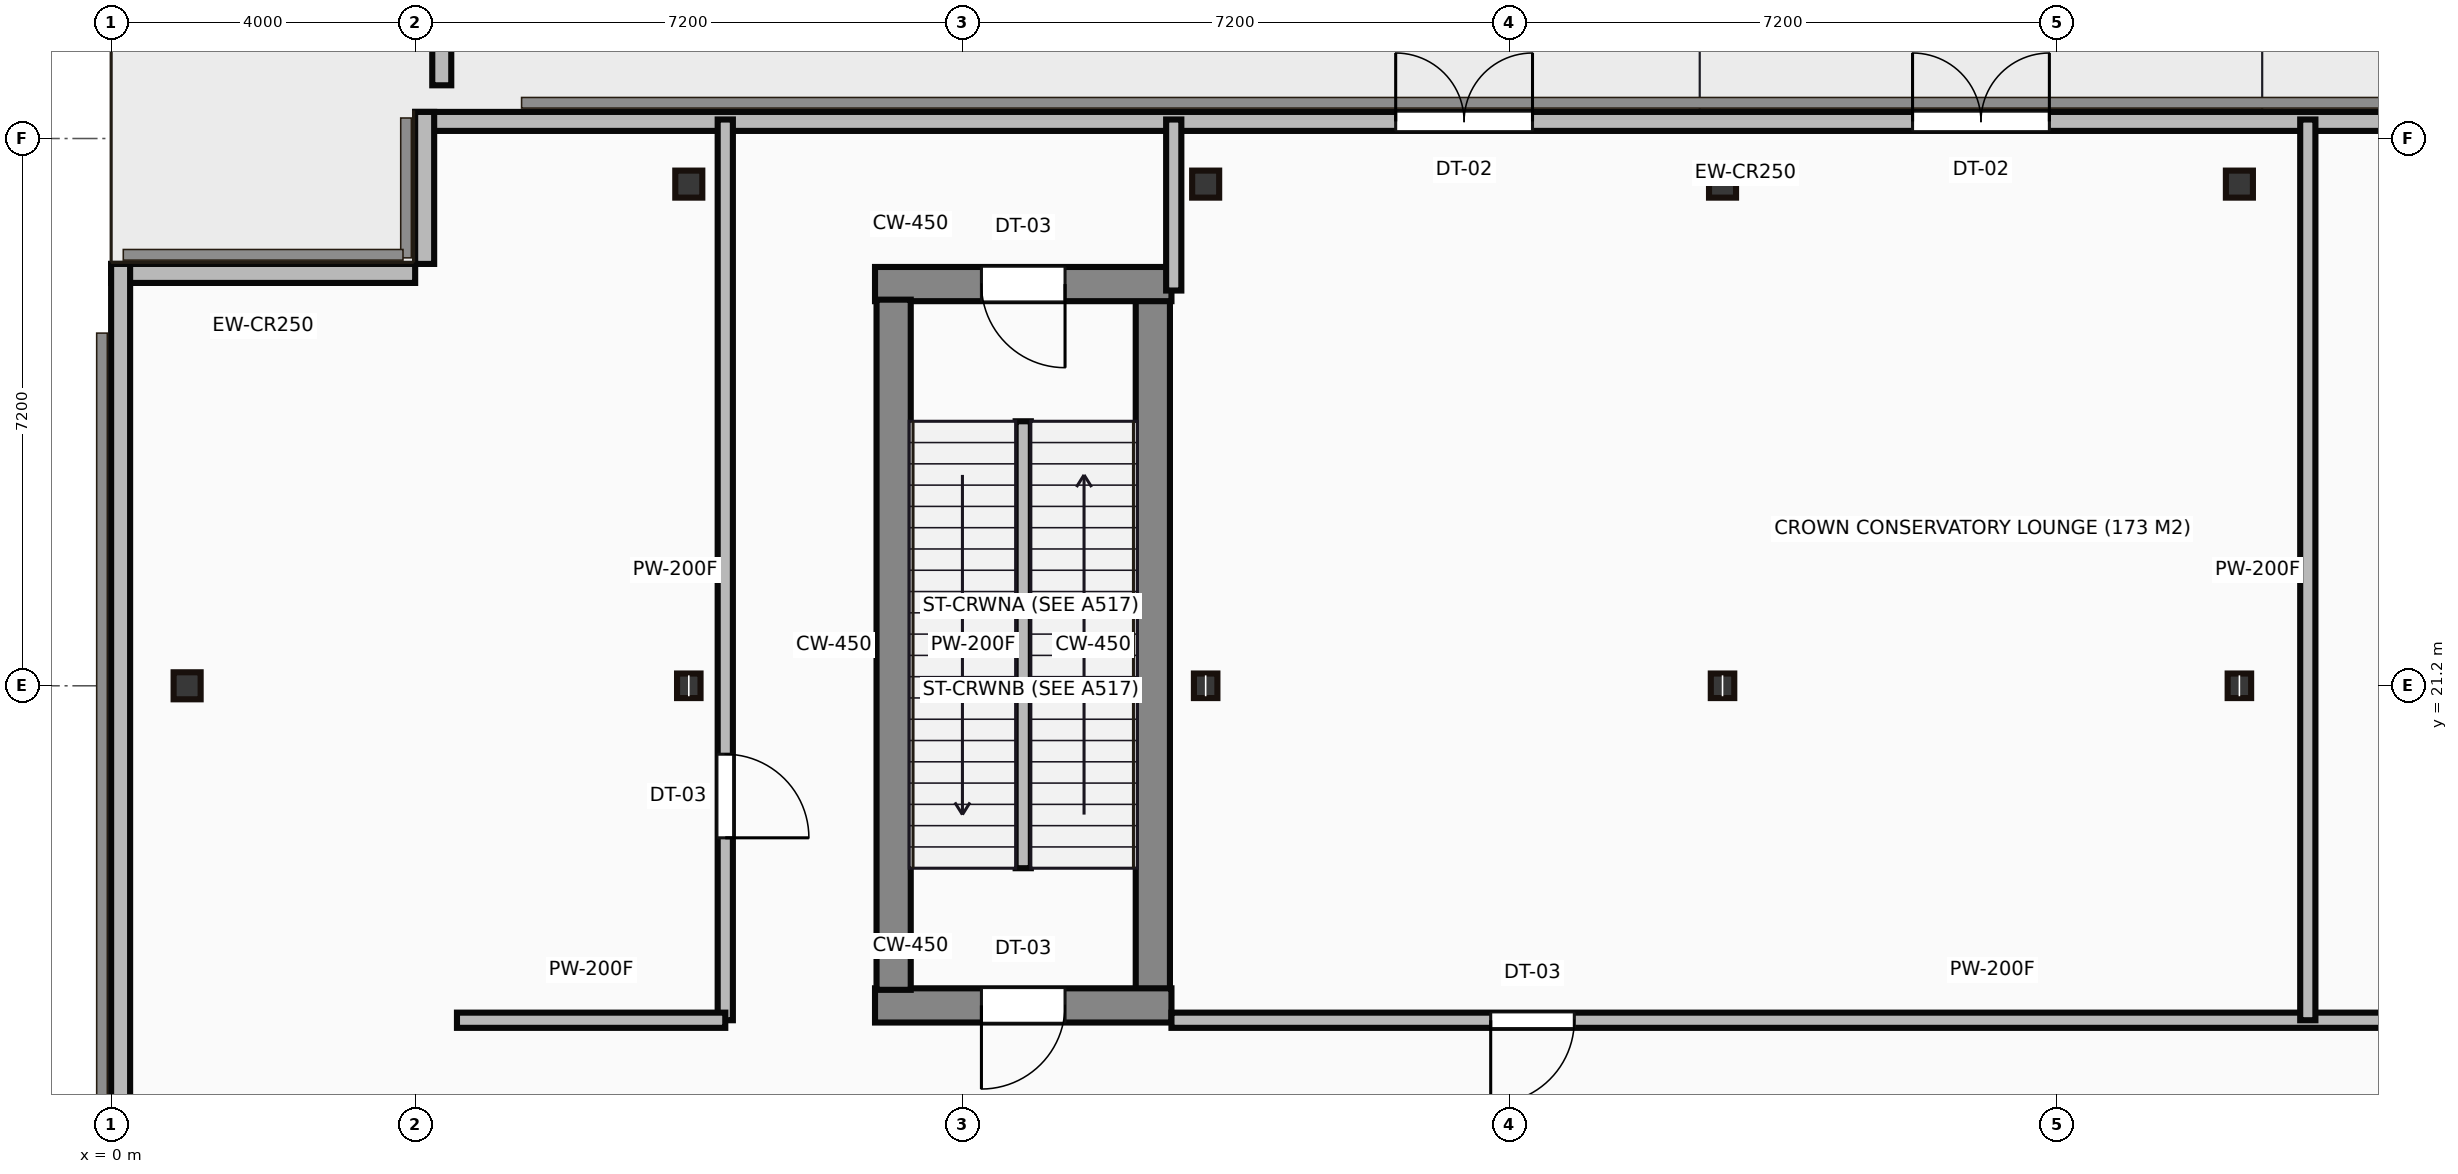
"""IFC4 building model, lengths in metres.
Left out: names, types, materials, properties, quantities, classifications, styles, units other than length and angle.
Written with IfcOpenShell. Run it as: python <this file> out.ifc"""

import sys

from ifc_helpers import new_model, si_unit, direction, frame, frame_2d, origin, origin_2d, place, context, subcontext, project, spatial, rectangle, hollow_rectangle, i_section, extrude, source, transform, mapped, element, fill, save


model = new_model("IFC4")
c1 = context("Model", 3, precision=1e-05, world=origin(), true_north=direction((0.0, 1.0)))
c2 = subcontext(c1, "Body", "Model", "MODEL_VIEW")
j1 = project(units=[si_unit("LENGTHUNIT", "METRE"), si_unit("PLANEANGLEUNIT", "RADIAN")], contexts=[c1])
p1 = place(None, origin())
s1 = spatial("IfcSite", under=j1, at=p1, CompositionType="ELEMENT")
p2 = place(p1, origin())
s2 = spatial("IfcBuilding", under=s1, at=p2, CompositionType="ELEMENT")
p3 = place(p2, frame((0.0, 0.0, 292.25)))
s3 = spatial("IfcBuildingStorey", under=s2, at=p3, CompositionType="ELEMENT", Elevation=292.25)
m1 = source(origin(), c2, "Body", "SweptSolid", [
    extrude(hollow_rectangle(XDim=0.356, YDim=0.356, WallThickness=0.019, at=origin_2d()), origin(), (0.0, 0.0, 1.0), 3.8),
])
p4 = place(p3, frame((1.0, 21.2, 0.0), z_axis=(0.0, 0.0, 1.0), x_axis=(1.0, 0.0, 0.0)))
e1 = element("IfcColumn", 1, at=p4, inside=s3, PredefinedType="COLUMN", context=c2, shape_type="MappedRepresentation", body=[
    mapped(m1, transform((0.0, 0.0, 0.0))),
])
m2 = source(origin(), c2, "Body", "SweptSolid", [
    extrude(i_section(OverallWidth=0.309, OverallDepth=0.323, WebThickness=0.014, FlangeThickness=0.023, at=origin_2d()), origin(), (0.0, 0.0, 1.0), 3.8),
])
p5 = place(p3, frame((7.6, 21.2, 0.0), z_axis=(0.0, 0.0, 1.0), x_axis=(1.0, 0.0, 0.0)))
e2 = element("IfcColumn", 2, at=p5, inside=s3, PredefinedType="COLUMN", context=c2, shape_type="MappedRepresentation", body=[
    mapped(m2, transform((0.0, 0.0, 0.0))),
])
p6 = place(p3, frame((7.6, 27.8, 0.0), z_axis=(0.0, 0.0, 1.0), x_axis=(1.0, 0.0, 0.0)))
e3 = element("IfcColumn", 3, at=p6, inside=s3, PredefinedType="COLUMN", context=c2, shape_type="MappedRepresentation", body=[
    mapped(m1, transform((0.0, 0.0, 0.0))),
])
p7 = place(p3, frame((14.4, 21.2, 0.0), z_axis=(0.0, 0.0, 1.0), x_axis=(1.0, 0.0, 0.0)))
e4 = element("IfcColumn", 4, at=p7, inside=s3, PredefinedType="COLUMN", context=c2, shape_type="MappedRepresentation", body=[
    mapped(m2, transform((0.0, 0.0, 0.0))),
])
p8 = place(p3, frame((14.4, 27.8, 0.0), z_axis=(0.0, 0.0, 1.0), x_axis=(1.0, 0.0, 0.0)))
e5 = element("IfcColumn", 5, at=p8, inside=s3, PredefinedType="COLUMN", context=c2, shape_type="MappedRepresentation", body=[
    mapped(m1, transform((0.0, 0.0, 0.0))),
])
p9 = place(p3, frame((21.2, 21.2, 0.0), z_axis=(0.0, 0.0, 1.0), x_axis=(1.0, 0.0, 0.0)))
e6 = element("IfcColumn", 6, at=p9, inside=s3, PredefinedType="COLUMN", context=c2, shape_type="MappedRepresentation", body=[
    mapped(m2, transform((0.0, 0.0, 0.0))),
])
p10 = place(p3, frame((21.2, 27.8, 0.0), z_axis=(0.0, 0.0, 1.0), x_axis=(1.0, 0.0, 0.0)))
e7 = element("IfcColumn", 7, at=p10, inside=s3, PredefinedType="COLUMN", context=c2, shape_type="MappedRepresentation", body=[
    mapped(m1, transform((0.0, 0.0, 0.0))),
])
p11 = place(p3, frame((28.0, 21.2, 0.0), z_axis=(0.0, 0.0, 1.0), x_axis=(1.0, 0.0, 0.0)))
e8 = element("IfcColumn", 8, at=p11, inside=s3, PredefinedType="COLUMN", context=c2, shape_type="MappedRepresentation", body=[
    mapped(m2, transform((0.0, 0.0, 0.0))),
])
p12 = place(p3, frame((28.0, 27.8, 0.0), z_axis=(0.0, 0.0, 1.0), x_axis=(1.0, 0.0, 0.0)))
e9 = element("IfcColumn", 9, at=p12, inside=s3, PredefinedType="COLUMN", context=c2, shape_type="MappedRepresentation", body=[
    mapped(m1, transform((0.0, 0.0, 0.0))),
])
m3 = source(origin(), c2, "Body", "SweptSolid", [
    extrude(rectangle(XDim=35.0, YDim=0.25, at=frame_2d((17.5, 0.0))), origin(), (0.0, 0.0, 1.0), 3.5),
])
p13 = place(p3, frame((39.0, 28.625, 0.0), z_axis=(0.0, 0.0, 1.0), x_axis=(-1.0, 0.0, 0.0)))
e10 = element("IfcWall", 10, at=p13, inside=s3, PredefinedType="STANDARD", context=c2, shape_type="MappedRepresentation", body=[
    mapped(m3, transform((0.0, 0.0, 0.0))),
])
p14 = place(p13, frame((13.5, 0.0, 0.0)))
e11 = element("IfcOpeningElement", 11, at=p14, cuts=e10, PredefinedType="OPENING", context=c2, shape_type="SweptSolid", body=[
    extrude(rectangle(XDim=1.8, YDim=2.2, at=frame_2d((0.9, 1.1))), frame((0.0, 0.135, 0.0), z_axis=(0.0, -1.0, 0.0), x_axis=(1.0, 0.0, 0.0)), (0.0, 0.0, 1.0), 0.27),
])
p15 = place(p13, frame((20.3, 0.0, 0.0)))
e12 = element("IfcOpeningElement", 12, at=p15, cuts=e10, PredefinedType="OPENING", context=c2, shape_type="SweptSolid", body=[
    extrude(rectangle(XDim=1.8, YDim=2.2, at=frame_2d((0.9, 1.1))), frame((0.0, 0.135, 0.0), z_axis=(0.0, -1.0, 0.0), x_axis=(1.0, 0.0, 0.0)), (0.0, 0.0, 1.0), 0.27),
])
m4 = source(origin(), c2, "Body", "SweptSolid", [
    extrude(rectangle(XDim=2.0, YDim=0.25, at=frame_2d((1.0, 0.0))), origin(), (0.0, 0.0, 1.0), 3.5),
])
p16 = place(p3, frame((4.125, 28.75, 0.0), z_axis=(0.0, 0.0, 1.0), x_axis=(0.0, -1.0, 0.0)))
e13 = element("IfcWall", 13, at=p16, inside=s3, PredefinedType="STANDARD", context=c2, shape_type="MappedRepresentation", body=[
    mapped(m4, transform((0.0, 0.0, 0.0))),
])
m5 = source(origin(), c2, "Body", "SweptSolid", [
    extrude(rectangle(XDim=4.0, YDim=0.25, at=frame_2d((2.0, 0.0))), origin(), (0.0, 0.0, 1.0), 3.5),
])
p17 = place(p3, frame((4.0, 26.625, 0.0), z_axis=(0.0, 0.0, 1.0), x_axis=(-1.0, 0.0, 0.0)))
e14 = element("IfcWall", 14, at=p17, inside=s3, PredefinedType="STANDARD", context=c2, shape_type="MappedRepresentation", body=[
    mapped(m5, transform((0.0, 0.0, 0.0))),
])
m6 = source(origin(), c2, "Body", "SweptSolid", [
    extrude(rectangle(XDim=22.75, YDim=0.25, at=frame_2d((11.375, 0.0))), origin(), (0.0, 0.0, 1.0), 3.5),
])
p18 = place(p3, frame((0.125, 26.75, 0.0), z_axis=(0.0, 0.0, 1.0), x_axis=(0.0, -1.0, 0.0)))
e15 = element("IfcWall", 15, at=p18, inside=s3, PredefinedType="STANDARD", context=c2, shape_type="MappedRepresentation", body=[
    mapped(m6, transform((0.0, 0.0, 0.0))),
])
m7 = source(origin(), c2, "Body", "SweptSolid", [
    extrude(rectangle(XDim=5.7, YDim=0.25, at=frame_2d((2.85, 0.0))), origin(), (0.0, 0.0, 1.0), 1.15),
])
p19 = place(p3, frame((4.35, 29.1, 0.0), z_axis=(0.0, 0.0, 1.0), x_axis=(0.0, 1.0, 0.0)))
e16 = element("IfcWall", 16, at=p19, inside=s3, PredefinedType="PARAPET", context=c2, shape_type="MappedRepresentation", body=[
    mapped(m7, transform((0.0, 0.0, 0.0))),
])
m8 = source(origin(), c2, "Body", "SweptSolid", [
    extrude(rectangle(XDim=3.9, YDim=0.45, at=frame_2d((1.95, 0.0))), origin(), (0.0, 0.0, 1.0), 3.8),
])
p20 = place(p3, frame((10.05, 16.995, 0.0), z_axis=(0.0, 0.0, 1.0), x_axis=(1.0, 0.0, 0.0)))
e17 = element("IfcWall", 17, at=p20, inside=s3, PredefinedType="SHEAR", context=c2, shape_type="MappedRepresentation", body=[
    mapped(m8, transform((0.0, 0.0, 0.0))),
])
p21 = place(p20, frame((1.4, 0.0, 0.0)))
e18 = element("IfcOpeningElement", 18, at=p21, cuts=e17, PredefinedType="OPENING", context=c2, shape_type="SweptSolid", body=[
    extrude(rectangle(XDim=1.1, YDim=2.15, at=frame_2d((0.55, 1.075))), frame((0.0, 0.235, 0.0), z_axis=(0.0, -1.0, 0.0), x_axis=(1.0, 0.0, 0.0)), (0.0, 0.0, 1.0), 0.47),
])
m9 = source(origin(), c2, "Body", "SweptSolid", [
    extrude(rectangle(XDim=9.08, YDim=0.45, at=frame_2d((4.54, 0.0))), origin(), (0.0, 0.0, 1.0), 3.8),
])
for number, where, z_axis, x_axis in (
    (19, (10.295, 17.2, 0.0), (0.0, 0.0, 1.0), (0.0, 1.0, 0.0)),
    (20, (13.705, 17.2, 0.0), (0.0, 0.0, 1.0), (0.0, 1.0, 0.0)),
):
    element("IfcWall", number, at=place(p3, frame(where, z_axis=z_axis, x_axis=x_axis)), inside=s3, PredefinedType="SHEAR", context=c2, shape_type="MappedRepresentation", body=[
        mapped(m9, transform((0.0, 0.0, 0.0))),
    ])
p22 = place(p3, frame((10.05, 26.485, 0.0), z_axis=(0.0, 0.0, 1.0), x_axis=(1.0, 0.0, 0.0)))
e21 = element("IfcWall", 21, at=p22, inside=s3, PredefinedType="SHEAR", context=c2, shape_type="MappedRepresentation", body=[
    mapped(m8, transform((0.0, 0.0, 0.0))),
])
p23 = place(p22, frame((1.4, 0.0, 0.0)))
e22 = element("IfcOpeningElement", 22, at=p23, cuts=e21, PredefinedType="OPENING", context=c2, shape_type="SweptSolid", body=[
    extrude(rectangle(XDim=1.1, YDim=2.15, at=frame_2d((0.55, 1.075))), frame((0.0, 0.235, 0.0), z_axis=(0.0, -1.0, 0.0), x_axis=(1.0, 0.0, 0.0)), (0.0, 0.0, 1.0), 0.47),
])
m10 = source(origin(), c2, "Body", "SweptSolid", [
    extrude(rectangle(XDim=5.88, YDim=0.2, at=frame_2d((2.94, 0.0))), origin(), (0.0, 0.0, 1.0), 3.08),
])
p24 = place(p3, frame((12.0, 18.8, 0.0), z_axis=(0.0, 0.0, 1.0), x_axis=(0.0, 1.0, 0.0)))
e23 = element("IfcWall", 23, at=p24, inside=s3, PredefinedType="PARTITIONING", context=c2, shape_type="MappedRepresentation", body=[
    mapped(m10, transform((0.0, 0.0, 0.0))),
])
m11 = source(origin(), c2, "Body", "SweptSolid", [
    extrude(rectangle(XDim=11.85, YDim=0.2, at=frame_2d((5.925, 0.0))), origin(), (0.0, 0.0, 1.0), 3.5),
])
p25 = place(p3, frame((8.08, 16.8, 0.0), z_axis=(0.0, 0.0, 1.0), x_axis=(0.0, 1.0, 0.0)))
e24 = element("IfcWall", 24, at=p25, inside=s3, PredefinedType="PARTITIONING", context=c2, shape_type="MappedRepresentation", body=[
    mapped(m11, transform((0.0, 0.0, 0.0))),
])
p26 = place(p25, frame((2.4, 0.0, 0.0)))
e25 = element("IfcOpeningElement", 25, at=p26, cuts=e24, PredefinedType="OPENING", context=c2, shape_type="SweptSolid", body=[
    extrude(rectangle(XDim=1.1, YDim=2.15, at=frame_2d((0.55, 1.075))), frame((0.0, 0.11, 0.0), z_axis=(0.0, -1.0, 0.0), x_axis=(1.0, 0.0, 0.0)), (0.0, 0.0, 1.0), 0.22),
])
m12 = source(origin(), c2, "Body", "SweptSolid", [
    extrude(rectangle(XDim=3.53, YDim=0.2, at=frame_2d((1.765, 0.0))), origin(), (0.0, 0.0, 1.0), 3.5),
])
p27 = place(p3, frame((4.55, 16.8, 0.0), z_axis=(0.0, 0.0, 1.0), x_axis=(1.0, 0.0, 0.0)))
e26 = element("IfcWall", 26, at=p27, inside=s3, PredefinedType="PARTITIONING", context=c2, shape_type="MappedRepresentation", body=[
    mapped(m12, transform((0.0, 0.0, 0.0))),
])
m13 = source(origin(), c2, "Body", "SweptSolid", [
    extrude(rectangle(XDim=21.6, YDim=0.2, at=frame_2d((10.8, 0.0))), origin(), (0.0, 0.0, 1.0), 3.5),
])
p28 = place(p3, frame((13.95, 16.8, 0.0), z_axis=(0.0, 0.0, 1.0), x_axis=(1.0, 0.0, 0.0)))
e27 = element("IfcWall", 27, at=p28, inside=s3, PredefinedType="PARTITIONING", context=c2, shape_type="MappedRepresentation", body=[
    mapped(m13, transform((0.0, 0.0, 0.0))),
])
p29 = place(p28, frame((4.2, 0.0, 0.0)))
e28 = element("IfcOpeningElement", 28, at=p29, cuts=e27, PredefinedType="OPENING", context=c2, shape_type="SweptSolid", body=[
    extrude(rectangle(XDim=1.1, YDim=2.15, at=frame_2d((0.55, 1.075))), frame((0.0, 0.11, 0.0), z_axis=(0.0, -1.0, 0.0), x_axis=(1.0, 0.0, 0.0)), (0.0, 0.0, 1.0), 0.22),
])
p30 = place(p28, frame((16.8, 0.0, 0.0)))
e29 = element("IfcOpeningElement", 29, at=p30, cuts=e27, PredefinedType="OPENING", context=c2, shape_type="SweptSolid", body=[
    extrude(rectangle(XDim=1.1, YDim=2.15, at=frame_2d((0.55, 1.075))), frame((0.0, 0.11, 0.0), z_axis=(0.0, -1.0, 0.0), x_axis=(1.0, 0.0, 0.0)), (0.0, 0.0, 1.0), 0.22),
])
m14 = source(origin(), c2, "Body", "SweptSolid", [
    extrude(rectangle(XDim=2.25, YDim=0.2, at=frame_2d((1.125, 0.0))), origin(), (0.0, 0.0, 1.0), 3.5),
])
p31 = place(p3, frame((13.98, 26.4, 0.0), z_axis=(0.0, 0.0, 1.0), x_axis=(0.0, 1.0, 0.0)))
e30 = element("IfcWall", 30, at=p31, inside=s3, PredefinedType="PARTITIONING", context=c2, shape_type="MappedRepresentation", body=[
    mapped(m14, transform((0.0, 0.0, 0.0))),
])
p32 = place(p3, frame((28.9, 16.8, 0.0), z_axis=(0.0, 0.0, 1.0), x_axis=(0.0, 1.0, 0.0)))
e31 = element("IfcWall", 31, at=p32, inside=s3, PredefinedType="PARTITIONING", context=c2, shape_type="MappedRepresentation", body=[
    mapped(m11, transform((0.0, 0.0, 0.0))),
])
m15 = source(origin(), c2, "Body", "SweptSolid", [
    extrude(rectangle(XDim=1.8, YDim=2.2, at=frame_2d((0.9, 1.1))), frame((0.0, 0.025, 0.0), z_axis=(0.0, -1.0, 0.0), x_axis=(1.0, 0.0, 0.0)), (0.0, 0.0, 1.0), 0.05),
])
p33 = place(p14, frame((1.8, 0.0, 0.0), z_axis=(0.0, 0.0, 1.0), x_axis=(-1.0, 0.0, 0.0)))
e32 = element("IfcDoor", 32, at=p33, inside=s3, OperationType="DOUBLE_DOOR_SINGLE_SWING", PredefinedType="DOOR", context=c2, shape_type="MappedRepresentation", body=[
    mapped(m15, transform((0.0, 0.0, 0.0))),
])
fill(e11, e32)
p34 = place(p15, frame((1.8, 0.0, 0.0), z_axis=(0.0, 0.0, 1.0), x_axis=(-1.0, 0.0, 0.0)))
e33 = element("IfcDoor", 33, at=p34, inside=s3, OperationType="DOUBLE_DOOR_SINGLE_SWING", PredefinedType="DOOR", context=c2, shape_type="MappedRepresentation", body=[
    mapped(m15, transform((0.0, 0.0, 0.0))),
])
fill(e12, e33)
m16 = source(origin(), c2, "Body", "SweptSolid", [
    extrude(rectangle(XDim=1.1, YDim=2.15, at=frame_2d((0.55, 1.075))), frame((0.0, 0.025, 0.0), z_axis=(0.0, -1.0, 0.0), x_axis=(1.0, 0.0, 0.0)), (0.0, 0.0, 1.0), 0.05),
])
p35 = place(p26, frame((1.1, 0.0, 0.0), z_axis=(0.0, 0.0, 1.0), x_axis=(-1.0, 0.0, 0.0)))
e34 = element("IfcDoor", 34, at=p35, inside=s3, OperationType="SINGLE_SWING_LEFT", PredefinedType="DOOR", context=c2, shape_type="MappedRepresentation", body=[
    mapped(m16, transform((0.0, 0.0, 0.0))),
])
fill(e25, e34)
p36 = place(p29, origin())
e35 = element("IfcDoor", 35, at=p36, inside=s3, OperationType="SINGLE_SWING_LEFT", PredefinedType="DOOR", context=c2, shape_type="MappedRepresentation", body=[
    mapped(m16, transform((0.0, 0.0, 0.0))),
])
fill(e28, e35)
p37 = place(p21, origin())
e36 = element("IfcDoor", 36, at=p37, inside=s3, OperationType="SINGLE_SWING_LEFT", PredefinedType="DOOR", context=c2, shape_type="MappedRepresentation", body=[
    mapped(m16, transform((0.0, 0.0, 0.0))),
])
fill(e18, e36)
p38 = place(p23, frame((1.1, 0.0, 0.0), z_axis=(0.0, 0.0, 1.0), x_axis=(-1.0, 0.0, 0.0)))
e37 = element("IfcDoor", 37, at=p38, inside=s3, OperationType="SINGLE_SWING_RIGHT", PredefinedType="DOOR", context=c2, shape_type="MappedRepresentation", body=[
    mapped(m16, transform((0.0, 0.0, 0.0))),
])
fill(e22, e37)
save(model, sys.argv[1])
